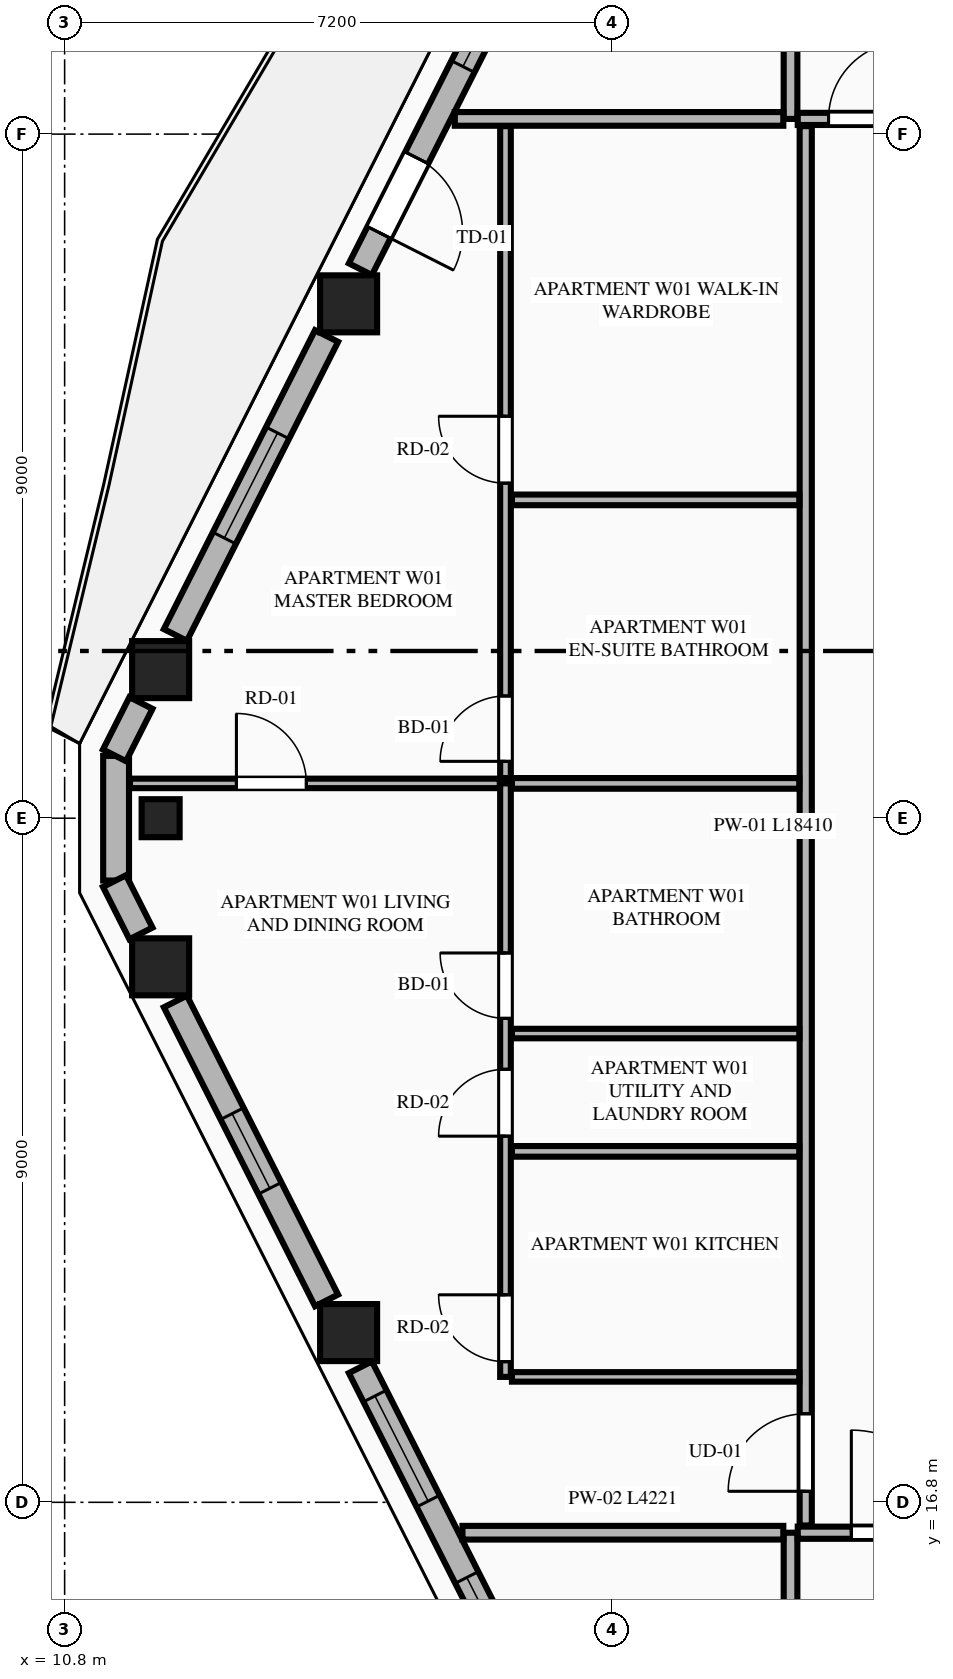
"""IFC4 building model, lengths in metres.
Left out: names, types, materials, properties, quantities, classifications, styles, units other than length and angle.
Written with IfcOpenShell. Run it as: python <this file> out.ifc"""

import sys

from ifc_helpers import new_model, si_unit, direction, frame, frame_2d, origin, origin_2d, place, context, subcontext, project, spatial, rectangle, extrude, element, fill, save


model = new_model("IFC4")
c1 = context("Model", 3, precision=1e-05, world=origin(), true_north=direction((0.0, 1.0)))
c2 = subcontext(c1, "Body", "Model", "MODEL_VIEW")
j1 = project(units=[si_unit("LENGTHUNIT", "METRE"), si_unit("PLANEANGLEUNIT", "RADIAN")], contexts=[c1])
p1 = place(None, origin())
s1 = spatial("IfcSite", under=j1, at=p1, CompositionType="ELEMENT")
p2 = place(p1, origin())
s2 = spatial("IfcBuilding", under=s1, at=p2, CompositionType="ELEMENT")
p3 = place(p2, frame((0.0, 0.0, 252.55)))
s3 = spatial("IfcBuildingStorey", under=s2, at=p3, CompositionType="ELEMENT", Elevation=252.55)
for number, where, z_axis, x_axis in (
    (1, (14.536, 32.567, 0.0), (0.0, 0.0, 1.0), (1.0, 0.0, 0.0)),
    (2, (12.063, 27.755, 0.0), (0.0, 0.0, 1.0), (1.0, 0.0, 0.0)),
    (3, (12.063, 23.845, 0.0), (0.0, 0.0, 1.0), (1.0, 0.0, 0.0)),
    (4, (14.536, 19.033, 0.0), (0.0, 0.0, 1.0), (1.0, 0.0, 0.0)),
):
    element("IfcColumn", number, at=place(p3, frame(where, z_axis=z_axis, x_axis=x_axis)), inside=s3, PredefinedType="COLUMN", context=c2, shape_type="SweptSolid", body=[
        extrude(rectangle(XDim=0.75, YDim=0.75, at=origin_2d()), origin(), (0.0, 0.0, 1.0), 3.65),
    ])
p4 = place(p3, frame((12.063, 25.8, 0.0), z_axis=(0.0, 0.0, 1.0), x_axis=(0.0, -1.0, 0.0)))
e5 = element("IfcColumn", 5, at=p4, inside=s3, PredefinedType="PILASTER", context=c2, shape_type="SweptSolid", body=[
    extrude(rectangle(XDim=0.5, YDim=0.35, at=origin_2d()), origin(), (0.0, 0.0, 1.0), 3.65),
])
p5 = place(p3, frame((11.477, 26.62, 0.0), z_axis=(0.0, 0.0, 1.0), x_axis=(0.0, -1.0, 0.0)))
e6 = element("IfcWall", 6, at=p5, inside=s3, PredefinedType="STANDARD", context=c2, shape_type="SweptSolid", body=[
    extrude(rectangle(XDim=1.64, YDim=0.34, at=frame_2d((0.82, 0.0))), origin(), (0.0, 0.0, 1.0), 3.45),
])
p6 = place(p3, frame((16.768, 37.127, 0.0), z_axis=(0.0, 0.0, 1.0), x_axis=(-0.451581819983, -0.892229712496, 0.0)))
e7 = element("IfcWall", 7, at=p6, inside=s3, PredefinedType="STANDARD", context=c2, shape_type="SweptSolid", body=[
    extrude(rectangle(XDim=4.6, YDim=0.34, at=frame_2d((2.3, 0.0))), origin(), (0.0, 0.0, 1.0), 2.983),
])
p7 = place(p6, frame((2.958, 0.0, 0.0)))
e8 = element("IfcOpeningElement", 8, at=p7, cuts=e7, PredefinedType="OPENING", context=c2, shape_type="SweptSolid", body=[
    extrude(rectangle(XDim=1.1, YDim=2.25, at=frame_2d((0.55, 1.125))), frame((0.0, 0.18, 0.0), z_axis=(0.0, -1.0, 0.0), x_axis=(1.0, 0.0, 0.0)), (0.0, 0.0, 1.0), 0.36),
])
p8 = place(p6, frame((0.512, 0.0, 0.75)))
e9 = element("IfcOpeningElement", 9, at=p8, cuts=e7, PredefinedType="OPENING", context=c2, shape_type="SweptSolid", body=[
    extrude(rectangle(XDim=1.1, YDim=2.0, at=frame_2d((0.55, 1.0))), frame((0.0, 0.18, 0.0), z_axis=(0.0, -1.0, 0.0), x_axis=(1.0, 0.0, 0.0)), (0.0, 0.0, 1.0), 0.36),
])
p9 = place(p3, frame((14.246, 32.144, 0.0), z_axis=(0.0, 0.0, 1.0), x_axis=(-0.451285866323, -0.892379441077, 0.0)))
e10 = element("IfcWall", 10, at=p9, inside=s3, PredefinedType="STANDARD", context=c2, shape_type="SweptSolid", body=[
    extrude(rectangle(XDim=4.407, YDim=0.34, at=frame_2d((2.204, 0.0))), origin(), (0.0, 0.0, 1.0), 2.983),
])
p10 = place(p9, frame((1.429, 0.0, 0.75)))
e11 = element("IfcOpeningElement", 11, at=p10, cuts=e10, PredefinedType="OPENING", context=c2, shape_type="SweptSolid", body=[
    extrude(rectangle(XDim=1.55, YDim=2.05, at=frame_2d((0.775, 1.025))), frame((0.0, 0.18, 0.0), z_axis=(0.0, -1.0, 0.0), x_axis=(1.0, 0.0, 0.0)), (0.0, 0.0, 1.0), 0.36),
])
for number, where, z_axis, x_axis in (
    (12, (11.804, 27.316, 0.0), (0.0, 0.0, 1.0), (-0.451, -0.893, 0.0)),
    (13, (11.456, 24.973, 0.0), (0.0, 0.0, 1.0), (0.451, -0.893, 0.0)),
):
    element("IfcWall", number, at=place(p3, frame(where, z_axis=z_axis, x_axis=x_axis)), inside=s3, PredefinedType="STANDARD", context=c2, shape_type="SweptSolid", body=[
        extrude(rectangle(XDim=0.772, YDim=0.34, at=frame_2d((0.386, 0.0))), origin(), (0.0, 0.0, 1.0), 3.45),
    ])
p11 = place(p3, frame((12.257, 23.389, 0.0), z_axis=(0.0, 0.0, 1.0), x_axis=(0.45130817501, -0.892368158984, 0.0)))
e14 = element("IfcWall", 14, at=p11, inside=s3, PredefinedType="STANDARD", context=c2, shape_type="SweptSolid", body=[
    extrude(rectangle(XDim=4.407, YDim=0.34, at=frame_2d((2.204, 0.0))), origin(), (0.0, 0.0, 1.0), 2.983),
])
p12 = place(p11, frame((1.654, 0.0, 0.75)))
e15 = element("IfcOpeningElement", 15, at=p12, cuts=e14, PredefinedType="OPENING", context=c2, shape_type="SweptSolid", body=[
    extrude(rectangle(XDim=1.1, YDim=2.0, at=frame_2d((0.55, 1.0))), frame((0.0, 0.18, 0.0), z_axis=(0.0, -1.0, 0.0), x_axis=(1.0, 0.0, 0.0)), (0.0, 0.0, 1.0), 0.36),
])
p13 = place(p3, frame((14.691, 18.577, 0.0), z_axis=(0.0, 0.0, 1.0), x_axis=(0.451581819983, -0.892229712496, 0.0)))
e16 = element("IfcWall", 16, at=p13, inside=s3, PredefinedType="STANDARD", context=c2, shape_type="SweptSolid", body=[
    extrude(rectangle(XDim=4.6, YDim=0.34, at=frame_2d((2.3, 0.0))), origin(), (0.0, 0.0, 1.0), 2.983),
])
p14 = place(p13, frame((0.424, 0.0, 0.75)))
e17 = element("IfcOpeningElement", 17, at=p14, cuts=e16, PredefinedType="OPENING", context=c2, shape_type="SweptSolid", body=[
    extrude(rectangle(XDim=1.55, YDim=2.05, at=frame_2d((0.775, 1.025))), frame((0.0, 0.18, 0.0), z_axis=(0.0, -1.0, 0.0), x_axis=(1.0, 0.0, 0.0)), (0.0, 0.0, 1.0), 0.36),
])
p15 = place(p13, frame((3.1, 0.0, 0.75)))
e18 = element("IfcOpeningElement", 18, at=p15, cuts=e16, PredefinedType="OPENING", context=c2, shape_type="SweptSolid", body=[
    extrude(rectangle(XDim=1.1, YDim=2.0, at=frame_2d((0.55, 1.0))), frame((0.0, 0.18, 0.0), z_axis=(0.0, -1.0, 0.0), x_axis=(1.0, 0.0, 0.0)), (0.0, 0.0, 1.0), 0.36),
])
p16 = place(p3, frame((20.35, 8.119, 0.0), z_axis=(0.0, 0.0, 1.0), x_axis=(0.0, 1.0, 0.0)))
e19 = element("IfcWall", 19, at=p16, inside=s3, PredefinedType="PARTITIONING", context=c2, shape_type="SweptSolid", body=[
    extrude(rectangle(XDim=8.281, YDim=0.18, at=frame_2d((4.141, 0.0))), origin(), (0.0, 0.0, 1.0), 3.45),
])
p17 = place(p3, frame((20.445, 16.4, 0.0), z_axis=(0.0, 0.0, 1.0), x_axis=(1.0, 0.0, 0.0)))
e20 = element("IfcWall", 20, at=p17, inside=s3, PredefinedType="PARTITIONING", context=c2, shape_type="SweptSolid", body=[
    extrude(rectangle(XDim=23.91, YDim=0.16, at=frame_2d((11.955, 0.0))), origin(), (0.0, 0.0, 1.0), 3.45),
])
p18 = place(p17, frame((0.705, 0.0, 0.0)))
e21 = element("IfcOpeningElement", 21, at=p18, cuts=e20, PredefinedType="OPENING", context=c2, shape_type="SweptSolid", body=[
    extrude(rectangle(XDim=1.35, YDim=2.35, at=frame_2d((0.675, 1.175))), frame((0.0, 0.09, 0.0), z_axis=(0.0, -1.0, 0.0), x_axis=(1.0, 0.0, 0.0)), (0.0, 0.0, 1.0), 0.18),
])
p19 = place(p3, frame((20.35, 35.0, 0.0), z_axis=(0.0, 0.0, 1.0), x_axis=(0.0, 1.0, 0.0)))
e22 = element("IfcWall", 22, at=p19, inside=s3, PredefinedType="PARTITIONING", context=c2, shape_type="SweptSolid", body=[
    extrude(rectangle(XDim=8.481, YDim=0.18, at=frame_2d((4.24, 0.0))), origin(), (0.0, 0.0, 1.0), 3.45),
])
p20 = place(p3, frame((20.445, 35.0, 0.0), z_axis=(0.0, 0.0, 1.0), x_axis=(1.0, 0.0, 0.0)))
e23 = element("IfcWall", 23, at=p20, inside=s3, PredefinedType="PARTITIONING", context=c2, shape_type="SweptSolid", body=[
    extrude(rectangle(XDim=8.606, YDim=0.16, at=frame_2d((4.303, 0.0))), origin(), (0.0, 0.0, 1.0), 3.45),
])
p21 = place(p20, frame((0.405, 0.0, 0.0)))
e24 = element("IfcOpeningElement", 24, at=p21, cuts=e23, PredefinedType="OPENING", context=c2, shape_type="SweptSolid", body=[
    extrude(rectangle(XDim=1.02, YDim=2.25, at=frame_2d((0.51, 1.125))), frame((0.0, 0.09, 0.0), z_axis=(0.0, -1.0, 0.0), x_axis=(1.0, 0.0, 0.0)), (0.0, 0.0, 1.0), 0.18),
])
p22 = place(p3, frame((16.034, 16.4, 0.0), z_axis=(0.0, 0.0, 1.0), x_axis=(1.0, 0.0, 0.0)))
e25 = element("IfcWall", 25, at=p22, inside=s3, PredefinedType="PARTITIONING", context=c2, shape_type="SweptSolid", body=[
    extrude(rectangle(XDim=4.221, YDim=0.18, at=frame_2d((2.11, 0.0))), origin(), (0.0, 0.0, 1.0), 3.45),
])
p23 = place(p3, frame((15.933, 35.0, 0.0), z_axis=(0.0, 0.0, 1.0), x_axis=(1.0, 0.0, 0.0)))
e26 = element("IfcWall", 26, at=p23, inside=s3, PredefinedType="PARTITIONING", context=c2, shape_type="SweptSolid", body=[
    extrude(rectangle(XDim=4.322, YDim=0.18, at=frame_2d((2.161, 0.0))), origin(), (0.0, 0.0, 1.0), 3.45),
])
p24 = place(p3, frame((20.55, 16.495, 0.0), z_axis=(0.0, 0.0, 1.0), x_axis=(0.0, 1.0, 0.0)))
e27 = element("IfcWall", 27, at=p24, inside=s3, PredefinedType="PARTITIONING", context=c2, shape_type="SweptSolid", body=[
    extrude(rectangle(XDim=18.41, YDim=0.16, at=frame_2d((9.205, 0.0))), origin(), (0.0, 0.0, 1.0), 3.137),
])
p25 = place(p24, frame((0.45, 0.0, 0.0)))
e28 = element("IfcOpeningElement", 28, at=p25, cuts=e27, PredefinedType="OPENING", context=c2, shape_type="SweptSolid", body=[
    extrude(rectangle(XDim=1.02, YDim=2.25, at=frame_2d((0.51, 1.125))), frame((0.0, 0.09, 0.0), z_axis=(0.0, -1.0, 0.0), x_axis=(1.0, 0.0, 0.0)), (0.0, 0.0, 1.0), 0.18),
])
p26 = place(p3, frame((16.685, 18.45, 0.0), z_axis=(0.0, 0.0, 1.0), x_axis=(1.0, 0.0, 0.0)))
e29 = element("IfcWall", 29, at=p26, inside=s3, PredefinedType="PARTITIONING", context=c2, shape_type="SweptSolid", body=[
    extrude(rectangle(XDim=3.78, YDim=0.125, at=frame_2d((1.89, 0.0))), origin(), (0.0, 0.0, 1.0), 3.45),
])
p27 = place(p3, frame((16.6, 18.45, 0.0), z_axis=(0.0, 0.0, 1.0), x_axis=(0.0, 1.0, 0.0)))
e30 = element("IfcWall", 30, at=p27, inside=s3, PredefinedType="PLUMBINGWALL", context=c2, shape_type="SweptSolid", body=[
    extrude(rectangle(XDim=7.808, YDim=0.14, at=frame_2d((3.904, 0.0))), origin(), (0.0, 0.0, 1.0), 3.45),
])
p28 = place(p27, frame((0.2, 0.0, 0.0)))
e31 = element("IfcOpeningElement", 31, at=p28, cuts=e30, PredefinedType="OPENING", context=c2, shape_type="SweptSolid", body=[
    extrude(rectangle(XDim=0.88, YDim=2.15, at=frame_2d((0.44, 1.075))), frame((0.0, 0.08, 0.0), z_axis=(0.0, -1.0, 0.0), x_axis=(1.0, 0.0, 0.0)), (0.0, 0.0, 1.0), 0.16),
])
p29 = place(p27, frame((3.167, 0.0, 0.0)))
e32 = element("IfcOpeningElement", 32, at=p29, cuts=e30, PredefinedType="OPENING", context=c2, shape_type="SweptSolid", body=[
    extrude(rectangle(XDim=0.88, YDim=2.15, at=frame_2d((0.44, 1.075))), frame((0.0, 0.08, 0.0), z_axis=(0.0, -1.0, 0.0), x_axis=(1.0, 0.0, 0.0)), (0.0, 0.0, 1.0), 0.16),
])
p30 = place(p27, frame((4.717, 0.0, 0.0)))
e33 = element("IfcOpeningElement", 33, at=p30, cuts=e30, PredefinedType="OPENING", context=c2, shape_type="SweptSolid", body=[
    extrude(rectangle(XDim=0.86, YDim=2.1, at=frame_2d((0.43, 1.05))), frame((0.0, 0.08, 0.0), z_axis=(0.0, -1.0, 0.0), x_axis=(1.0, 0.0, 0.0)), (0.0, 0.0, 1.0), 0.16),
])
p31 = place(p3, frame((16.6, 26.328, 0.0), z_axis=(0.0, 0.0, 1.0), x_axis=(0.0, 1.0, 0.0)))
e34 = element("IfcWall", 34, at=p31, inside=s3, PredefinedType="PLUMBINGWALL", context=c2, shape_type="SweptSolid", body=[
    extrude(rectangle(XDim=8.577, YDim=0.14, at=frame_2d((4.289, 0.0))), origin(), (0.0, 0.0, 1.0), 3.45),
])
p32 = place(p31, frame((0.22, 0.0, 0.0)))
e35 = element("IfcOpeningElement", 35, at=p32, cuts=e34, PredefinedType="OPENING", context=c2, shape_type="SweptSolid", body=[
    extrude(rectangle(XDim=0.86, YDim=2.1, at=frame_2d((0.43, 1.05))), frame((0.0, 0.08, 0.0), z_axis=(0.0, -1.0, 0.0), x_axis=(1.0, 0.0, 0.0)), (0.0, 0.0, 1.0), 0.16),
])
p33 = place(p31, frame((3.88, 0.0, 0.0)))
e36 = element("IfcOpeningElement", 36, at=p33, cuts=e34, PredefinedType="OPENING", context=c2, shape_type="SweptSolid", body=[
    extrude(rectangle(XDim=0.88, YDim=2.15, at=frame_2d((0.44, 1.075))), frame((0.0, 0.08, 0.0), z_axis=(0.0, -1.0, 0.0), x_axis=(1.0, 0.0, 0.0)), (0.0, 0.0, 1.0), 0.16),
])
p34 = place(p3, frame((16.685, 26.258, 0.0), z_axis=(0.0, 0.0, 1.0), x_axis=(1.0, 0.0, 0.0)))
e37 = element("IfcWall", 37, at=p34, inside=s3, PredefinedType="PLUMBINGWALL", context=c2, shape_type="SweptSolid", body=[
    extrude(rectangle(XDim=3.78, YDim=0.14, at=frame_2d((1.89, 0.0))), origin(), (0.0, 0.0, 1.0), 3.45),
])
p35 = place(p3, frame((11.66, 26.258, 0.0), z_axis=(0.0, 0.0, 1.0), x_axis=(1.0, 0.0, 0.0)))
e38 = element("IfcWall", 38, at=p35, inside=s3, PredefinedType="PARTITIONING", context=c2, shape_type="SweptSolid", body=[
    extrude(rectangle(XDim=4.865, YDim=0.125, at=frame_2d((2.433, 0.0))), origin(), (0.0, 0.0, 1.0), 3.45),
])
p36 = place(p35, frame((1.4, 0.0, 0.0)))
e39 = element("IfcOpeningElement", 39, at=p36, cuts=e38, PredefinedType="OPENING", context=c2, shape_type="SweptSolid", body=[
    extrude(rectangle(XDim=0.92, YDim=2.15, at=frame_2d((0.46, 1.075))), frame((0.0, 0.073, 0.0), z_axis=(0.0, -1.0, 0.0), x_axis=(1.0, 0.0, 0.0)), (0.0, 0.0, 1.0), 0.145),
])
p37 = place(p3, frame((16.685, 21.417, 0.0), z_axis=(0.0, 0.0, 1.0), x_axis=(1.0, 0.0, 0.0)))
e40 = element("IfcWall", 40, at=p37, inside=s3, PredefinedType="PLUMBINGWALL", context=c2, shape_type="SweptSolid", body=[
    extrude(rectangle(XDim=3.78, YDim=0.14, at=frame_2d((1.89, 0.0))), origin(), (0.0, 0.0, 1.0), 3.45),
])
p38 = place(p3, frame((16.685, 22.967, 0.0), z_axis=(0.0, 0.0, 1.0), x_axis=(1.0, 0.0, 0.0)))
e41 = element("IfcWall", 41, at=p38, inside=s3, PredefinedType="PARTITIONING", context=c2, shape_type="SweptSolid", body=[
    extrude(rectangle(XDim=3.78, YDim=0.125, at=frame_2d((1.89, 0.0))), origin(), (0.0, 0.0, 1.0), 3.45),
])
p39 = place(p3, frame((16.685, 29.988, 0.0), z_axis=(0.0, 0.0, 1.0), x_axis=(1.0, 0.0, 0.0)))
e42 = element("IfcWall", 42, at=p39, inside=s3, PredefinedType="PLUMBINGWALL", context=c2, shape_type="SweptSolid", body=[
    extrude(rectangle(XDim=3.78, YDim=0.14, at=frame_2d((1.89, 0.0))), origin(), (0.0, 0.0, 1.0), 3.45),
])
p40 = place(p7, origin())
e43 = element("IfcDoor", 43, at=p40, inside=s3, OperationType="SINGLE_SWING_RIGHT", PredefinedType="DOOR", context=c2, shape_type="SweptSolid", body=[
    extrude(rectangle(XDim=1.1, YDim=2.25, at=frame_2d((0.55, 1.125))), frame((0.0, 0.025, 0.0), z_axis=(0.0, -1.0, 0.0), x_axis=(1.0, 0.0, 0.0)), (0.0, 0.0, 1.0), 0.05),
])
fill(e8, e43)
p41 = place(p10, origin())
e44 = element("IfcWindow", 44, at=p41, inside=s3, PartitioningType="SINGLE_PANEL", PredefinedType="WINDOW", context=c2, shape_type="SweptSolid", body=[
    extrude(rectangle(XDim=1.55, YDim=2.05, at=frame_2d((0.775, 1.025))), frame((0.0, 0.03, 0.0), z_axis=(0.0, -1.0, 0.0), x_axis=(1.0, 0.0, 0.0)), (0.0, 0.0, 1.0), 0.06),
])
fill(e11, e44)
p42 = place(p12, origin())
e45 = element("IfcWindow", 45, at=p42, inside=s3, PartitioningType="SINGLE_PANEL", PredefinedType="WINDOW", context=c2, shape_type="SweptSolid", body=[
    extrude(rectangle(XDim=1.1, YDim=2.0, at=frame_2d((0.55, 1.0))), frame((0.0, 0.03, 0.0), z_axis=(0.0, -1.0, 0.0), x_axis=(1.0, 0.0, 0.0)), (0.0, 0.0, 1.0), 0.06),
])
fill(e15, e45)
p43 = place(p14, origin())
e46 = element("IfcWindow", 46, at=p43, inside=s3, PartitioningType="SINGLE_PANEL", PredefinedType="WINDOW", context=c2, shape_type="SweptSolid", body=[
    extrude(rectangle(XDim=1.55, YDim=2.05, at=frame_2d((0.775, 1.025))), frame((0.0, 0.03, 0.0), z_axis=(0.0, -1.0, 0.0), x_axis=(1.0, 0.0, 0.0)), (0.0, 0.0, 1.0), 0.06),
])
fill(e17, e46)
p44 = place(p18, origin())
e47 = element("IfcDoor", 47, at=p44, inside=s3, OperationType="SINGLE_SWING_LEFT", PredefinedType="DOOR", context=c2, shape_type="SweptSolid", body=[
    extrude(rectangle(XDim=1.35, YDim=2.35, at=frame_2d((0.675, 1.175))), frame((0.0, 0.025, 0.0), z_axis=(0.0, -1.0, 0.0), x_axis=(1.0, 0.0, 0.0)), (0.0, 0.0, 1.0), 0.05),
])
fill(e21, e47)
p45 = place(p21, origin())
e48 = element("IfcDoor", 48, at=p45, inside=s3, OperationType="SINGLE_SWING_RIGHT", PredefinedType="DOOR", context=c2, shape_type="SweptSolid", body=[
    extrude(rectangle(XDim=1.02, YDim=2.25, at=frame_2d((0.51, 1.125))), frame((0.0, 0.025, 0.0), z_axis=(0.0, -1.0, 0.0), x_axis=(1.0, 0.0, 0.0)), (0.0, 0.0, 1.0), 0.05),
])
fill(e24, e48)
p46 = place(p28, origin())
e49 = element("IfcDoor", 49, at=p46, inside=s3, OperationType="SINGLE_SWING_RIGHT", PredefinedType="DOOR", context=c2, shape_type="SweptSolid", body=[
    extrude(rectangle(XDim=0.88, YDim=2.15, at=frame_2d((0.44, 1.075))), frame((0.0, 0.025, 0.0), z_axis=(0.0, -1.0, 0.0), x_axis=(1.0, 0.0, 0.0)), (0.0, 0.0, 1.0), 0.05),
])
fill(e31, e49)
p47 = place(p29, origin())
e50 = element("IfcDoor", 50, at=p47, inside=s3, OperationType="SINGLE_SWING_LEFT", PredefinedType="DOOR", context=c2, shape_type="SweptSolid", body=[
    extrude(rectangle(XDim=0.88, YDim=2.15, at=frame_2d((0.44, 1.075))), frame((0.0, 0.025, 0.0), z_axis=(0.0, -1.0, 0.0), x_axis=(1.0, 0.0, 0.0)), (0.0, 0.0, 1.0), 0.05),
])
fill(e32, e50)
p48 = place(p30, origin())
e51 = element("IfcDoor", 51, at=p48, inside=s3, OperationType="SINGLE_SWING_RIGHT", PredefinedType="DOOR", context=c2, shape_type="SweptSolid", body=[
    extrude(rectangle(XDim=0.86, YDim=2.1, at=frame_2d((0.43, 1.05))), frame((0.0, 0.025, 0.0), z_axis=(0.0, -1.0, 0.0), x_axis=(1.0, 0.0, 0.0)), (0.0, 0.0, 1.0), 0.05),
])
fill(e33, e51)
p49 = place(p32, origin())
e52 = element("IfcDoor", 52, at=p49, inside=s3, OperationType="SINGLE_SWING_LEFT", PredefinedType="DOOR", context=c2, shape_type="SweptSolid", body=[
    extrude(rectangle(XDim=0.86, YDim=2.1, at=frame_2d((0.43, 1.05))), frame((0.0, 0.025, 0.0), z_axis=(0.0, -1.0, 0.0), x_axis=(1.0, 0.0, 0.0)), (0.0, 0.0, 1.0), 0.05),
])
fill(e35, e52)
p50 = place(p33, origin())
e53 = element("IfcDoor", 53, at=p50, inside=s3, OperationType="SINGLE_SWING_RIGHT", PredefinedType="DOOR", context=c2, shape_type="SweptSolid", body=[
    extrude(rectangle(XDim=0.88, YDim=2.15, at=frame_2d((0.44, 1.075))), frame((0.0, 0.025, 0.0), z_axis=(0.0, -1.0, 0.0), x_axis=(1.0, 0.0, 0.0)), (0.0, 0.0, 1.0), 0.05),
])
fill(e36, e53)
p51 = place(p25, origin())
e54 = element("IfcDoor", 54, at=p51, inside=s3, OperationType="SINGLE_SWING_LEFT", PredefinedType="DOOR", context=c2, shape_type="SweptSolid", body=[
    extrude(rectangle(XDim=1.02, YDim=2.25, at=frame_2d((0.51, 1.125))), frame((0.0, 0.025, 0.0), z_axis=(0.0, -1.0, 0.0), x_axis=(1.0, 0.0, 0.0)), (0.0, 0.0, 1.0), 0.05),
])
fill(e28, e54)
p52 = place(p36, origin())
e55 = element("IfcDoor", 55, at=p52, inside=s3, OperationType="SINGLE_SWING_LEFT", PredefinedType="DOOR", context=c2, shape_type="SweptSolid", body=[
    extrude(rectangle(XDim=0.92, YDim=2.15, at=frame_2d((0.46, 1.075))), frame((0.0, 0.025, 0.0), z_axis=(0.0, -1.0, 0.0), x_axis=(1.0, 0.0, 0.0)), (0.0, 0.0, 1.0), 0.05),
])
fill(e39, e55)
p53 = place(p8, origin())
e56 = element("IfcWindow", 56, at=p53, inside=s3, PartitioningType="SINGLE_PANEL", PredefinedType="WINDOW", context=c2, shape_type="SweptSolid", body=[
    extrude(rectangle(XDim=1.1, YDim=2.0, at=frame_2d((0.55, 1.0))), frame((0.0, 0.03, 0.0), z_axis=(0.0, -1.0, 0.0), x_axis=(1.0, 0.0, 0.0)), (0.0, 0.0, 1.0), 0.06),
])
fill(e9, e56)
p54 = place(p15, origin())
e57 = element("IfcWindow", 57, at=p54, inside=s3, PartitioningType="SINGLE_PANEL", PredefinedType="WINDOW", context=c2, shape_type="SweptSolid", body=[
    extrude(rectangle(XDim=1.1, YDim=2.0, at=frame_2d((0.55, 1.0))), frame((0.0, 0.03, 0.0), z_axis=(0.0, -1.0, 0.0), x_axis=(1.0, 0.0, 0.0)), (0.0, 0.0, 1.0), 0.06),
])
fill(e18, e57)
save(model, sys.argv[1])
